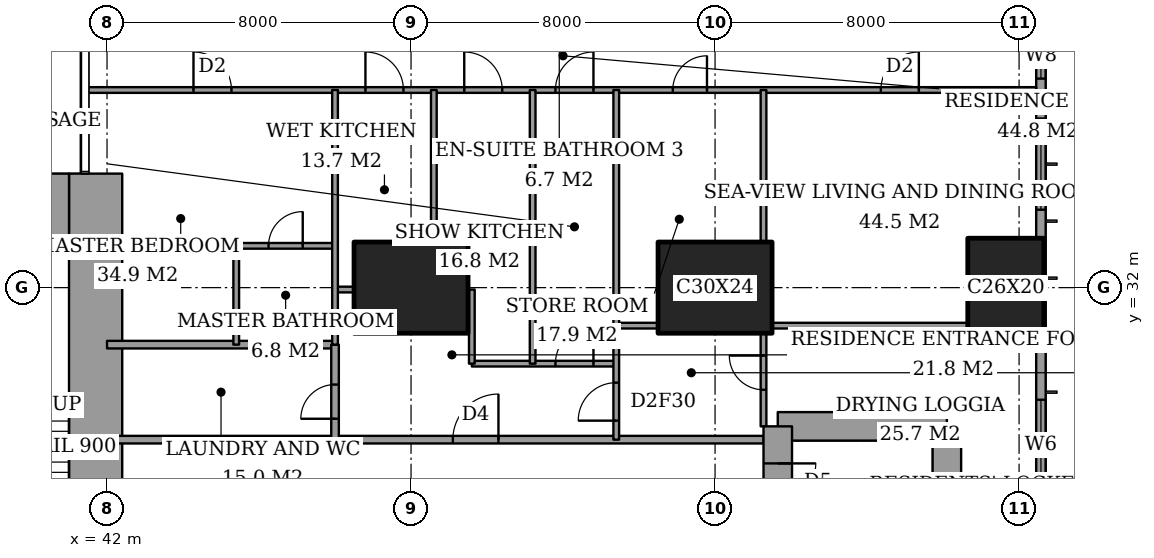
"""IFC4 building model, lengths in metres.
Left out: names, types, materials, properties, quantities, classifications, styles, units other than length and angle.
Written with IfcOpenShell. Run it as: python <this file> out.ifc"""

import sys

from ifc_helpers import new_model, si_unit, direction, frame, frame_2d, origin, origin_2d, place, context, subcontext, project, spatial, rectangle, extrude, element, fill, save


model = new_model("IFC4")
c1 = context("Model", 3, precision=1e-05, world=origin(), true_north=direction((0.0, 1.0)))
c2 = subcontext(c1, "Body", "Model", "MODEL_VIEW")
j1 = project(units=[si_unit("LENGTHUNIT", "METRE"), si_unit("PLANEANGLEUNIT", "RADIAN")], contexts=[c1])
p1 = place(None, origin())
s1 = spatial("IfcSite", under=j1, at=p1, CompositionType="ELEMENT")
p2 = place(p1, origin())
s2 = spatial("IfcBuilding", under=s1, at=p2, CompositionType="ELEMENT")
p3 = place(p2, frame((0.0, 0.0, 65.6)))
s3 = spatial("IfcBuildingStorey", under=s2, at=p3, CompositionType="ELEMENT", Elevation=65.6)
for number, where, z_axis, x_axis in (
    (1, (50.0, 32.0, 0.0), (0.0, 0.0, 1.0), (1.0, 0.0, 0.0)),
    (2, (58.0, 32.0, 0.0), (0.0, 0.0, 1.0), (1.0, 0.0, 0.0)),
):
    element("IfcColumn", number, at=place(p3, frame(where, z_axis=z_axis, x_axis=x_axis)), inside=s3, PredefinedType="COLUMN", context=c2, shape_type="SweptSolid", body=[
        extrude(rectangle(XDim=3.0, YDim=2.4, at=origin_2d()), origin(), (0.0, 0.0, 1.0), 3.6),
    ])
p4 = place(p3, frame((65.65, 32.0, 0.0), z_axis=(0.0, 0.0, 1.0), x_axis=(0.0, 1.0, 0.0)))
e3 = element("IfcColumn", 3, at=p4, inside=s3, PredefinedType="COLUMN", context=c2, shape_type="SweptSolid", body=[
    extrude(rectangle(XDim=2.6, YDim=2.0, at=origin_2d()), origin(), (0.0, 0.0, 1.0), 3.6),
])
p5 = place(p3, frame((37.85, 34.0, 0.0), z_axis=(0.0, 0.0, 1.0), x_axis=(1.0, 0.0, 0.0)))
e4 = element("IfcWall", 4, at=p5, inside=s3, PredefinedType="SHEAR", context=c2, shape_type="SweptSolid", body=[
    extrude(rectangle(XDim=3.15, YDim=2.0, at=frame_2d((1.575, 0.0))), origin(), (0.0, 0.0, 1.0), 3.6),
])
p6 = place(p3, frame((41.7, 24.85, 0.0), z_axis=(0.0, 0.0, 1.0), x_axis=(0.0, 1.0, 0.0)))
e5 = element("IfcWall", 5, at=p6, inside=s3, PredefinedType="SHEAR", context=c2, shape_type="SweptSolid", body=[
    extrude(rectangle(XDim=10.15, YDim=1.4, at=frame_2d((5.075, 0.0))), origin(), (0.0, 0.0, 1.0), 3.6),
])
p7 = place(p3, frame((64.1, 19.65, 0.0), z_axis=(0.0, 0.0, 1.0), x_axis=(0.0, 1.0, 0.0)))
e6 = element("IfcWall", 6, at=p7, inside=s3, PredefinedType="SHEAR", context=c2, shape_type="SweptSolid", body=[
    extrude(rectangle(XDim=8.7, YDim=0.75, at=frame_2d((4.35, 0.0))), origin(), (0.0, 0.0, 1.0), 3.6),
])
p8 = place(p3, frame((64.1, 28.35, 0.0), z_axis=(0.0, 0.0, 1.0), x_axis=(-1.0, 0.0, 0.0)))
e7 = element("IfcWall", 7, at=p8, inside=s3, PredefinedType="SHEAR", context=c2, shape_type="SweptSolid", body=[
    extrude(rectangle(XDim=4.45, YDim=0.75, at=frame_2d((2.225, 0.0))), origin(), (0.0, 0.0, 1.0), 3.6),
])
p9 = place(p3, frame((59.65, 28.35, 0.0), z_axis=(0.0, 0.0, 1.0), x_axis=(0.0, -1.0, 0.0)))
e8 = element("IfcWall", 8, at=p9, inside=s3, PredefinedType="SHEAR", context=c2, shape_type="SweptSolid", body=[
    extrude(rectangle(XDim=8.7, YDim=0.75, at=frame_2d((4.35, 0.0))), origin(), (0.0, 0.0, 1.0), 3.6),
])
p10 = place(p9, frame((0.975, 0.0, 0.0)))
e9 = element("IfcOpeningElement", 9, at=p10, cuts=e8, PredefinedType="OPENING", context=c2, shape_type="SweptSolid", body=[
    extrude(rectangle(XDim=1.0, YDim=2.1, at=frame_2d((0.5, 1.05))), frame((0.0, 0.385, 0.0), z_axis=(0.0, -1.0, 0.0), x_axis=(1.0, 0.0, 0.0)), (0.0, 0.0, 1.0), 0.77),
])
p11 = place(p3, frame((66.575, 3.175, 0.0), z_axis=(0.0, 0.0, 1.0), x_axis=(0.0, 1.0, 0.0)))
e10 = element("IfcWall", 10, at=p11, inside=s3, PredefinedType="SOLIDWALL", context=c2, shape_type="SweptSolid", body=[
    extrude(rectangle(XDim=41.65, YDim=0.25, at=frame_2d((20.825, 0.0))), origin(), (0.0, 0.0, 1.0), 3.6),
])
p12 = place(p11, frame((0.775, 0.0, 0.6)))
e11 = element("IfcOpeningElement", 11, at=p12, cuts=e10, PredefinedType="OPENING", context=c2, shape_type="SweptSolid", body=[
    extrude(rectangle(XDim=2.4, YDim=2.0, at=frame_2d((1.2, 1.0))), frame((0.0, 0.135, 0.0), z_axis=(0.0, -1.0, 0.0), x_axis=(1.0, 0.0, 0.0)), (0.0, 0.0, 1.0), 0.27),
])
p13 = place(p11, frame((6.1, 0.0, 0.6)))
e12 = element("IfcOpeningElement", 12, at=p13, cuts=e10, PredefinedType="OPENING", context=c2, shape_type="SweptSolid", body=[
    extrude(rectangle(XDim=1.2, YDim=2.0, at=frame_2d((0.6, 1.0))), frame((0.0, 0.135, 0.0), z_axis=(0.0, -1.0, 0.0), x_axis=(1.0, 0.0, 0.0)), (0.0, 0.0, 1.0), 0.27),
])
p14 = place(p11, frame((8.275, 0.0, 0.6)))
e13 = element("IfcOpeningElement", 13, at=p14, cuts=e10, PredefinedType="OPENING", context=c2, shape_type="SweptSolid", body=[
    extrude(rectangle(XDim=2.4, YDim=2.0, at=frame_2d((1.2, 1.0))), frame((0.0, 0.135, 0.0), z_axis=(0.0, -1.0, 0.0), x_axis=(1.0, 0.0, 0.0)), (0.0, 0.0, 1.0), 0.27),
])
p15 = place(p11, frame((15.775, 0.0, 0.6)))
e14 = element("IfcOpeningElement", 14, at=p15, cuts=e10, PredefinedType="OPENING", context=c2, shape_type="SweptSolid", body=[
    extrude(rectangle(XDim=2.4, YDim=2.0, at=frame_2d((1.2, 1.0))), frame((0.0, 0.135, 0.0), z_axis=(0.0, -1.0, 0.0), x_axis=(1.0, 0.0, 0.0)), (0.0, 0.0, 1.0), 0.27),
])
p16 = place(p11, frame((23.475, 0.0, 0.6)))
e15 = element("IfcOpeningElement", 15, at=p16, cuts=e10, PredefinedType="OPENING", context=c2, shape_type="SweptSolid", body=[
    extrude(rectangle(XDim=2.4, YDim=2.0, at=frame_2d((1.2, 1.0))), frame((0.0, 0.135, 0.0), z_axis=(0.0, -1.0, 0.0), x_axis=(1.0, 0.0, 0.0)), (0.0, 0.0, 1.0), 0.27),
])
p17 = place(p11, frame((30.875, 0.0, 0.6)))
e16 = element("IfcOpeningElement", 16, at=p17, cuts=e10, PredefinedType="OPENING", context=c2, shape_type="SweptSolid", body=[
    extrude(rectangle(XDim=2.4, YDim=2.0, at=frame_2d((1.2, 1.0))), frame((0.0, 0.135, 0.0), z_axis=(0.0, -1.0, 0.0), x_axis=(1.0, 0.0, 0.0)), (0.0, 0.0, 1.0), 0.27),
])
p18 = place(p11, frame((34.325, 0.0, 0.6)))
e17 = element("IfcOpeningElement", 17, at=p18, cuts=e10, PredefinedType="OPENING", context=c2, shape_type="SweptSolid", body=[
    extrude(rectangle(XDim=1.2, YDim=2.0, at=frame_2d((0.6, 1.0))), frame((0.0, 0.135, 0.0), z_axis=(0.0, -1.0, 0.0), x_axis=(1.0, 0.0, 0.0)), (0.0, 0.0, 1.0), 0.27),
])
p19 = place(p11, frame((38.475, 0.0, 0.6)))
e18 = element("IfcOpeningElement", 18, at=p19, cuts=e10, PredefinedType="OPENING", context=c2, shape_type="SweptSolid", body=[
    extrude(rectangle(XDim=2.4, YDim=2.0, at=frame_2d((1.2, 1.0))), frame((0.0, 0.135, 0.0), z_axis=(0.0, -1.0, 0.0), x_axis=(1.0, 0.0, 0.0)), (0.0, 0.0, 1.0), 0.27),
])
p20 = place(p3, frame((42.0, 28.0, 0.0), z_axis=(0.0, 0.0, 1.0), x_axis=(1.0, 0.0, 0.0)))
e19 = element("IfcWall", 19, at=p20, inside=s3, PredefinedType="PARTITIONING", context=c2, shape_type="SweptSolid", body=[
    extrude(rectangle(XDim=17.275, YDim=0.2, at=frame_2d((8.637, 0.0))), origin(), (0.0, 0.0, 1.0), 3.35),
])
p21 = place(p20, frame((9.1, 0.0, 0.0)))
e20 = element("IfcOpeningElement", 20, at=p21, cuts=e19, PredefinedType="OPENING", context=c2, shape_type="SweptSolid", body=[
    extrude(rectangle(XDim=1.2, YDim=2.4, at=frame_2d((0.6, 1.2))), frame((0.0, 0.11, 0.0), z_axis=(0.0, -1.0, 0.0), x_axis=(1.0, 0.0, 0.0)), (0.0, 0.0, 1.0), 0.22),
])
p22 = place(p3, frame((51.6, 30.0, 0.0), z_axis=(0.0, 0.0, 1.0), x_axis=(1.0, 0.0, 0.0)))
e21 = element("IfcWall", 21, at=p22, inside=s3, PredefinedType="PARTITIONING", context=c2, shape_type="SweptSolid", body=[
    extrude(rectangle(XDim=3.8, YDim=0.15, at=frame_2d((1.9, 0.0))), origin(), (0.0, 0.0, 1.0), 3.35),
])
p23 = place(p22, frame((2.2, 0.0, 0.0)))
e22 = element("IfcOpeningElement", 22, at=p23, cuts=e21, PredefinedType="OPENING", context=c2, shape_type="SweptSolid", body=[
    extrude(rectangle(XDim=1.0, YDim=2.1, at=frame_2d((0.5, 1.05))), frame((0.0, 0.085, 0.0), z_axis=(0.0, -1.0, 0.0), x_axis=(1.0, 0.0, 0.0)), (0.0, 0.0, 1.0), 0.17),
])
p24 = place(p3, frame((42.0, 30.5, 0.0), z_axis=(0.0, 0.0, 1.0), x_axis=(1.0, 0.0, 0.0)))
e23 = element("IfcWall", 23, at=p24, inside=s3, PredefinedType="PARTITIONING", context=c2, shape_type="SweptSolid", body=[
    extrude(rectangle(XDim=6.0, YDim=0.2, at=frame_2d((3.0, 0.0))), origin(), (0.0, 0.0, 1.0), 3.35),
])
p25 = place(p3, frame((55.4, 31.0, 0.0), z_axis=(0.0, 0.0, 1.0), x_axis=(1.0, 0.0, 0.0)))
e24 = element("IfcWall", 24, at=p25, inside=s3, PredefinedType="PARTITIONING", context=c2, shape_type="SweptSolid", body=[
    extrude(rectangle(XDim=1.1, YDim=0.15, at=frame_2d((0.55, 0.0))), origin(), (0.0, 0.0, 1.0), 3.35),
])
p26 = place(p3, frame((59.5, 31.0, 0.0), z_axis=(0.0, 0.0, 1.0), x_axis=(1.0, 0.0, 0.0)))
e25 = element("IfcWall", 25, at=p26, inside=s3, PredefinedType="PARTITIONING", context=c2, shape_type="SweptSolid", body=[
    extrude(rectangle(XDim=5.15, YDim=0.15, at=frame_2d((2.575, 0.0))), origin(), (0.0, 0.0, 1.0), 3.35),
])
p27 = place(p3, frame((48.0, 31.95, 0.0), z_axis=(0.0, 0.0, 1.0), x_axis=(1.0, 0.0, 0.0)))
e26 = element("IfcWall", 26, at=p27, inside=s3, PredefinedType="PARTITIONING", context=c2, shape_type="SweptSolid", body=[
    extrude(rectangle(XDim=0.5, YDim=0.15, at=frame_2d((0.25, 0.0))), origin(), (0.0, 0.0, 1.0), 2.634),
])
p28 = place(p3, frame((45.4, 33.1, 0.0), z_axis=(0.0, 0.0, 1.0), x_axis=(1.0, 0.0, 0.0)))
e27 = element("IfcWall", 27, at=p28, inside=s3, PredefinedType="PARTITIONING", context=c2, shape_type="SweptSolid", body=[
    extrude(rectangle(XDim=2.6, YDim=0.15, at=frame_2d((1.3, 0.0))), origin(), (0.0, 0.0, 1.0), 3.35),
])
p29 = place(p28, frame((0.85, 0.0, 0.0)))
e28 = element("IfcOpeningElement", 28, at=p29, cuts=e27, PredefinedType="OPENING", context=c2, shape_type="SweptSolid", body=[
    extrude(rectangle(XDim=0.9, YDim=2.1, at=frame_2d((0.45, 1.05))), frame((0.0, 0.085, 0.0), z_axis=(0.0, -1.0, 0.0), x_axis=(1.0, 0.0, 0.0)), (0.0, 0.0, 1.0), 0.17),
])
p30 = place(p3, frame((41.439, 37.2, 0.0), z_axis=(0.0, 0.0, 1.0), x_axis=(1.0, 0.0, 0.0)))
e29 = element("IfcWall", 29, at=p30, inside=s3, PredefinedType="PARTITIONING", context=c2, shape_type="SweptSolid", body=[
    extrude(rectangle(XDim=25.011, YDim=0.15, at=frame_2d((12.505, 0.0))), origin(), (0.0, 0.0, 1.0), 3.35),
])
p31 = place(p30, frame((12.361, 0.0, 0.0)))
e30 = element("IfcOpeningElement", 30, at=p31, cuts=e29, PredefinedType="OPENING", context=c2, shape_type="SweptSolid", body=[
    extrude(rectangle(XDim=1.0, YDim=2.1, at=frame_2d((0.5, 1.05))), frame((0.0, 0.085, 0.0), z_axis=(0.0, -1.0, 0.0), x_axis=(1.0, 0.0, 0.0)), (0.0, 0.0, 1.0), 0.17),
])
p32 = place(p30, frame((20.924, 0.0, 0.0)))
e31 = element("IfcOpeningElement", 31, at=p32, cuts=e29, PredefinedType="OPENING", context=c2, shape_type="SweptSolid", body=[
    extrude(rectangle(XDim=1.0, YDim=2.1, at=frame_2d((0.5, 1.05))), frame((0.0, 0.085, 0.0), z_axis=(0.0, -1.0, 0.0), x_axis=(1.0, 0.0, 0.0)), (0.0, 0.0, 1.0), 0.17),
])
p33 = place(p30, frame((15.448, 0.0, 0.0)))
e32 = element("IfcOpeningElement", 32, at=p33, cuts=e29, PredefinedType="OPENING", context=c2, shape_type="SweptSolid", body=[
    extrude(rectangle(XDim=0.9, YDim=2.1, at=frame_2d((0.45, 1.05))), frame((0.0, 0.085, 0.0), z_axis=(0.0, -1.0, 0.0), x_axis=(1.0, 0.0, 0.0)), (0.0, 0.0, 1.0), 0.17),
])
p34 = place(p30, frame((9.961, 0.0, 0.0)))
e33 = element("IfcOpeningElement", 33, at=p34, cuts=e29, PredefinedType="OPENING", context=c2, shape_type="SweptSolid", body=[
    extrude(rectangle(XDim=1.0, YDim=2.1, at=frame_2d((0.5, 1.05))), frame((0.0, 0.085, 0.0), z_axis=(0.0, -1.0, 0.0), x_axis=(1.0, 0.0, 0.0)), (0.0, 0.0, 1.0), 0.17),
])
p35 = place(p30, frame((7.361, 0.0, 0.0)))
e34 = element("IfcOpeningElement", 34, at=p35, cuts=e29, PredefinedType="OPENING", context=c2, shape_type="SweptSolid", body=[
    extrude(rectangle(XDim=1.0, YDim=2.1, at=frame_2d((0.5, 1.05))), frame((0.0, 0.085, 0.0), z_axis=(0.0, -1.0, 0.0), x_axis=(1.0, 0.0, 0.0)), (0.0, 0.0, 1.0), 0.17),
])
p36 = place(p30, frame((2.836, 0.0, 0.0)))
e35 = element("IfcOpeningElement", 35, at=p36, cuts=e29, PredefinedType="OPENING", context=c2, shape_type="SweptSolid", body=[
    extrude(rectangle(XDim=1.0, YDim=2.1, at=frame_2d((0.5, 1.05))), frame((0.0, 0.085, 0.0), z_axis=(0.0, -1.0, 0.0), x_axis=(1.0, 0.0, 0.0)), (0.0, 0.0, 1.0), 0.17),
])
p37 = place(p3, frame((45.4, 30.5, 0.0), z_axis=(0.0, 0.0, 1.0), x_axis=(0.0, 1.0, 0.0)))
e36 = element("IfcWall", 36, at=p37, inside=s3, PredefinedType="PARTITIONING", context=c2, shape_type="SweptSolid", body=[
    extrude(rectangle(XDim=2.6, YDim=0.15, at=frame_2d((1.3, 0.0))), origin(), (0.0, 0.0, 1.0), 3.35),
])
p38 = place(p3, frame((48.0, 28.0, 0.0), z_axis=(0.0, 0.0, 1.0), x_axis=(0.0, 1.0, 0.0)))
e37 = element("IfcWall", 37, at=p38, inside=s3, PredefinedType="PARTITIONING", context=c2, shape_type="SweptSolid", body=[
    extrude(rectangle(XDim=2.5, YDim=0.2, at=frame_2d((1.25, 0.0))), origin(), (0.0, 0.0, 1.0), 3.35),
])
p39 = place(p38, frame((0.55, 0.0, 0.0)))
e38 = element("IfcOpeningElement", 38, at=p39, cuts=e37, PredefinedType="OPENING", context=c2, shape_type="SweptSolid", body=[
    extrude(rectangle(XDim=0.9, YDim=2.1, at=frame_2d((0.45, 1.05))), frame((0.0, 0.11, 0.0), z_axis=(0.0, -1.0, 0.0), x_axis=(1.0, 0.0, 0.0)), (0.0, 0.0, 1.0), 0.22),
])
p40 = place(p3, frame((48.0, 30.5, 0.0), z_axis=(0.0, 0.0, 1.0), x_axis=(0.0, 1.0, 0.0)))
e39 = element("IfcWall", 39, at=p40, inside=s3, PredefinedType="PARTITIONING", context=c2, shape_type="SweptSolid", body=[
    extrude(rectangle(XDim=6.7, YDim=0.15, at=frame_2d((3.35, 0.0))), origin(), (0.0, 0.0, 1.0), 3.35),
])
p41 = place(p3, frame((50.6, 33.2, 0.0), z_axis=(0.0, 0.0, 1.0), x_axis=(0.0, 1.0, 0.0)))
e40 = element("IfcWall", 40, at=p41, inside=s3, PredefinedType="PARTITIONING", context=c2, shape_type="SweptSolid", body=[
    extrude(rectangle(XDim=4.0, YDim=0.15, at=frame_2d((2.0, 0.0))), origin(), (0.0, 0.0, 1.0), 3.35),
])
p42 = place(p3, frame((51.6, 30.0, 0.0), z_axis=(0.0, 0.0, 1.0), x_axis=(0.0, 1.0, 0.0)))
e41 = element("IfcWall", 41, at=p42, inside=s3, PredefinedType="PARTITIONING", context=c2, shape_type="SweptSolid", body=[
    extrude(rectangle(XDim=1.95, YDim=0.15, at=frame_2d((0.975, 0.0))), origin(), (0.0, 0.0, 1.0), 3.35),
])
p43 = place(p3, frame((53.2, 30.0, 0.0), z_axis=(0.0, 0.0, 1.0), x_axis=(0.0, 1.0, 0.0)))
e42 = element("IfcWall", 42, at=p43, inside=s3, PredefinedType="PARTITIONING", context=c2, shape_type="SweptSolid", body=[
    extrude(rectangle(XDim=7.2, YDim=0.15, at=frame_2d((3.6, 0.0))), origin(), (0.0, 0.0, 1.0), 3.35),
])
p44 = place(p3, frame((55.4, 28.0, 0.0), z_axis=(0.0, 0.0, 1.0), x_axis=(0.0, 1.0, 0.0)))
e43 = element("IfcWall", 43, at=p44, inside=s3, PredefinedType="PARTITIONING", context=c2, shape_type="SweptSolid", body=[
    extrude(rectangle(XDim=9.2, YDim=0.15, at=frame_2d((4.6, 0.0))), origin(), (0.0, 0.0, 1.0), 3.35),
])
p45 = place(p44, frame((0.5, 0.0, 0.0)))
e44 = element("IfcOpeningElement", 44, at=p45, cuts=e43, PredefinedType="OPENING", context=c2, shape_type="SweptSolid", body=[
    extrude(rectangle(XDim=1.0, YDim=2.1, at=frame_2d((0.5, 1.05))), frame((0.0, 0.085, 0.0), z_axis=(0.0, -1.0, 0.0), x_axis=(1.0, 0.0, 0.0)), (0.0, 0.0, 1.0), 0.17),
])
p46 = place(p3, frame((59.275, 28.35, 0.0), z_axis=(0.0, 0.0, 1.0), x_axis=(0.0, 1.0, 0.0)))
e45 = element("IfcWall", 45, at=p46, inside=s3, PredefinedType="PARTITIONING", context=c2, shape_type="SweptSolid", body=[
    extrude(rectangle(XDim=2.45, YDim=0.15, at=frame_2d((1.225, 0.0))), origin(), (0.0, 0.0, 1.0), 3.35),
])
p47 = place(p46, frame((0.962, 0.0, 0.0)))
e46 = element("IfcOpeningElement", 46, at=p47, cuts=e45, PredefinedType="OPENING", context=c2, shape_type="SweptSolid", body=[
    extrude(rectangle(XDim=0.9, YDim=2.1, at=frame_2d((0.45, 1.05))), frame((0.0, 0.085, 0.0), z_axis=(0.0, -1.0, 0.0), x_axis=(1.0, 0.0, 0.0)), (0.0, 0.0, 1.0), 0.17),
])
p48 = place(p3, frame((59.275, 33.2, 0.0), z_axis=(0.0, 0.0, 1.0), x_axis=(0.0, 1.0, 0.0)))
e47 = element("IfcWall", 47, at=p48, inside=s3, PredefinedType="PARTITIONING", context=c2, shape_type="SweptSolid", body=[
    extrude(rectangle(XDim=4.0, YDim=0.15, at=frame_2d((2.0, 0.0))), origin(), (0.0, 0.0, 1.0), 3.35),
])
p49 = place(p16, origin())
e48 = element("IfcWindow", 48, at=p49, inside=s3, PartitioningType="SINGLE_PANEL", PredefinedType="WINDOW", context=c2, shape_type="SweptSolid", body=[
    extrude(rectangle(XDim=2.4, YDim=2.0, at=frame_2d((1.2, 1.0))), frame((0.0, 0.03, 0.0), z_axis=(0.0, -1.0, 0.0), x_axis=(1.0, 0.0, 0.0)), (0.0, 0.0, 1.0), 0.06),
])
fill(e15, e48)
p50 = place(p17, origin())
e49 = element("IfcWindow", 49, at=p50, inside=s3, PartitioningType="SINGLE_PANEL", PredefinedType="WINDOW", context=c2, shape_type="SweptSolid", body=[
    extrude(rectangle(XDim=2.4, YDim=2.0, at=frame_2d((1.2, 1.0))), frame((0.0, 0.03, 0.0), z_axis=(0.0, -1.0, 0.0), x_axis=(1.0, 0.0, 0.0)), (0.0, 0.0, 1.0), 0.06),
])
fill(e16, e49)
p51 = place(p18, origin())
e50 = element("IfcWindow", 50, at=p51, inside=s3, PartitioningType="SINGLE_PANEL", PredefinedType="WINDOW", context=c2, shape_type="SweptSolid", body=[
    extrude(rectangle(XDim=1.2, YDim=2.0, at=frame_2d((0.6, 1.0))), frame((0.0, 0.03, 0.0), z_axis=(0.0, -1.0, 0.0), x_axis=(1.0, 0.0, 0.0)), (0.0, 0.0, 1.0), 0.06),
])
fill(e17, e50)
p52 = place(p31, origin())
e51 = element("IfcDoor", 51, at=p52, inside=s3, OperationType="SINGLE_SWING_LEFT", PredefinedType="DOOR", context=c2, shape_type="SweptSolid", body=[
    extrude(rectangle(XDim=1.0, YDim=2.1, at=frame_2d((0.5, 1.05))), frame((0.0, 0.025, 0.0), z_axis=(0.0, -1.0, 0.0), x_axis=(1.0, 0.0, 0.0)), (0.0, 0.0, 1.0), 0.05),
])
fill(e30, e51)
p53 = place(p32, origin())
e52 = element("IfcDoor", 52, at=p53, inside=s3, OperationType="SINGLE_SWING_LEFT", PredefinedType="DOOR", context=c2, shape_type="SweptSolid", body=[
    extrude(rectangle(XDim=1.0, YDim=2.1, at=frame_2d((0.5, 1.05))), frame((0.0, 0.025, 0.0), z_axis=(0.0, -1.0, 0.0), x_axis=(1.0, 0.0, 0.0)), (0.0, 0.0, 1.0), 0.05),
])
fill(e31, e52)
p54 = place(p47, origin())
e53 = element("IfcDoor", 53, at=p54, inside=s3, OperationType="SINGLE_SWING_LEFT", PredefinedType="DOOR", context=c2, shape_type="SweptSolid", body=[
    extrude(rectangle(XDim=0.9, YDim=2.1, at=frame_2d((0.45, 1.05))), frame((0.0, 0.025, 0.0), z_axis=(0.0, -1.0, 0.0), x_axis=(1.0, 0.0, 0.0)), (0.0, 0.0, 1.0), 0.05),
])
fill(e46, e53)
p55 = place(p33, origin())
e54 = element("IfcDoor", 54, at=p55, inside=s3, OperationType="SINGLE_SWING_LEFT", PredefinedType="DOOR", context=c2, shape_type="SweptSolid", body=[
    extrude(rectangle(XDim=0.9, YDim=2.1, at=frame_2d((0.45, 1.05))), frame((0.0, 0.025, 0.0), z_axis=(0.0, -1.0, 0.0), x_axis=(1.0, 0.0, 0.0)), (0.0, 0.0, 1.0), 0.05),
])
fill(e32, e54)
p56 = place(p45, origin())
e55 = element("IfcDoor", 55, at=p56, inside=s3, OperationType="SINGLE_SWING_RIGHT", PredefinedType="DOOR", context=c2, shape_type="SweptSolid", body=[
    extrude(rectangle(XDim=1.0, YDim=2.1, at=frame_2d((0.5, 1.05))), frame((0.0, 0.025, 0.0), z_axis=(0.0, -1.0, 0.0), x_axis=(1.0, 0.0, 0.0)), (0.0, 0.0, 1.0), 0.05),
])
fill(e44, e55)
p57 = place(p21, origin())
e56 = element("IfcDoor", 56, at=p57, inside=s3, OperationType="SINGLE_SWING_LEFT", PredefinedType="DOOR", context=c2, shape_type="SweptSolid", body=[
    extrude(rectangle(XDim=1.2, YDim=2.4, at=frame_2d((0.6, 1.2))), frame((0.0, 0.025, 0.0), z_axis=(0.0, -1.0, 0.0), x_axis=(1.0, 0.0, 0.0)), (0.0, 0.0, 1.0), 0.05),
])
fill(e20, e56)
p58 = place(p23, origin())
e57 = element("IfcDoor", 57, at=p58, inside=s3, OperationType="SINGLE_SWING_LEFT", PredefinedType="DOOR", context=c2, shape_type="SweptSolid", body=[
    extrude(rectangle(XDim=1.0, YDim=2.1, at=frame_2d((0.5, 1.05))), frame((0.0, 0.025, 0.0), z_axis=(0.0, -1.0, 0.0), x_axis=(1.0, 0.0, 0.0)), (0.0, 0.0, 1.0), 0.05),
])
fill(e22, e57)
p59 = place(p34, origin())
e58 = element("IfcDoor", 58, at=p59, inside=s3, OperationType="SINGLE_SWING_RIGHT", PredefinedType="DOOR", context=c2, shape_type="SweptSolid", body=[
    extrude(rectangle(XDim=1.0, YDim=2.1, at=frame_2d((0.5, 1.05))), frame((0.0, 0.025, 0.0), z_axis=(0.0, -1.0, 0.0), x_axis=(1.0, 0.0, 0.0)), (0.0, 0.0, 1.0), 0.05),
])
fill(e33, e58)
p60 = place(p35, origin())
e59 = element("IfcDoor", 59, at=p60, inside=s3, OperationType="SINGLE_SWING_RIGHT", PredefinedType="DOOR", context=c2, shape_type="SweptSolid", body=[
    extrude(rectangle(XDim=1.0, YDim=2.1, at=frame_2d((0.5, 1.05))), frame((0.0, 0.025, 0.0), z_axis=(0.0, -1.0, 0.0), x_axis=(1.0, 0.0, 0.0)), (0.0, 0.0, 1.0), 0.05),
])
fill(e34, e59)
p61 = place(p29, origin())
e60 = element("IfcDoor", 60, at=p61, inside=s3, OperationType="SINGLE_SWING_LEFT", PredefinedType="DOOR", context=c2, shape_type="SweptSolid", body=[
    extrude(rectangle(XDim=0.9, YDim=2.1, at=frame_2d((0.45, 1.05))), frame((0.0, 0.025, 0.0), z_axis=(0.0, -1.0, 0.0), x_axis=(1.0, 0.0, 0.0)), (0.0, 0.0, 1.0), 0.05),
])
fill(e28, e60)
p62 = place(p36, origin())
e61 = element("IfcDoor", 61, at=p62, inside=s3, OperationType="SINGLE_SWING_RIGHT", PredefinedType="DOOR", context=c2, shape_type="SweptSolid", body=[
    extrude(rectangle(XDim=1.0, YDim=2.1, at=frame_2d((0.5, 1.05))), frame((0.0, 0.025, 0.0), z_axis=(0.0, -1.0, 0.0), x_axis=(1.0, 0.0, 0.0)), (0.0, 0.0, 1.0), 0.05),
])
fill(e35, e61)
p63 = place(p39, origin())
e62 = element("IfcDoor", 62, at=p63, inside=s3, OperationType="SINGLE_SWING_RIGHT", PredefinedType="DOOR", context=c2, shape_type="SweptSolid", body=[
    extrude(rectangle(XDim=0.9, YDim=2.1, at=frame_2d((0.45, 1.05))), frame((0.0, 0.025, 0.0), z_axis=(0.0, -1.0, 0.0), x_axis=(1.0, 0.0, 0.0)), (0.0, 0.0, 1.0), 0.05),
])
fill(e38, e62)
p64 = place(p10, origin())
e63 = element("IfcDoor", 63, at=p64, inside=s3, OperationType="SINGLE_SWING_RIGHT", PredefinedType="DOOR", context=c2, shape_type="SweptSolid", body=[
    extrude(rectangle(XDim=1.0, YDim=2.1, at=frame_2d((0.5, 1.05))), frame((0.0, 0.025, 0.0), z_axis=(0.0, -1.0, 0.0), x_axis=(1.0, 0.0, 0.0)), (0.0, 0.0, 1.0), 0.05),
])
fill(e9, e63)
save(model, sys.argv[1])
